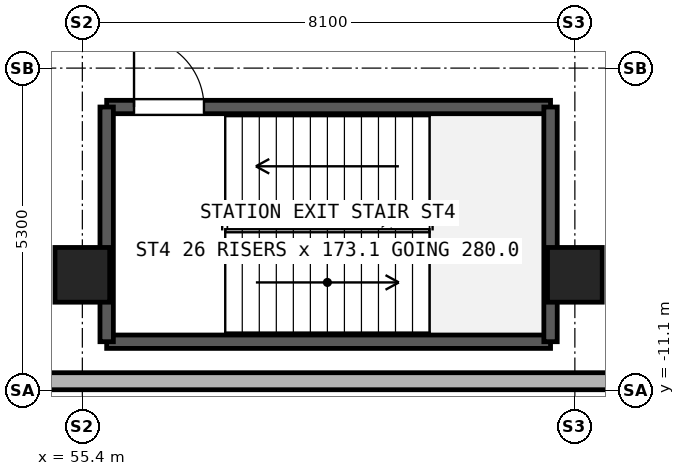
"""IFC4 building model, lengths in metres.
Left out: names, types, materials, properties, quantities, classifications, styles, units other than length and angle.
Written with IfcOpenShell. Run it as: python <this file> out.ifc"""

import sys

from ifc_helpers import new_model, si_unit, direction, frame, frame_2d, origin, origin_2d, place, context, subcontext, project, spatial, rectangle, hollow_rectangle, extrude, source, transform, mapped, element, fill, save


model = new_model("IFC4")
c1 = context("Model", 3, precision=1e-05, world=origin(), true_north=direction((0.0, 1.0)))
c2 = subcontext(c1, "Body", "Model", "MODEL_VIEW")
j1 = project(units=[si_unit("LENGTHUNIT", "METRE"), si_unit("PLANEANGLEUNIT", "RADIAN")], contexts=[c1])
p1 = place(None, origin())
s1 = spatial("IfcSite", under=j1, at=p1, CompositionType="ELEMENT")
p2 = place(p1, origin())
s2 = spatial("IfcBuilding", under=s1, at=p2, CompositionType="ELEMENT")
p3 = place(p2, frame((0.0, 0.0, 9.0)))
s3 = spatial("IfcBuildingStorey", under=s2, at=p3, CompositionType="ELEMENT", Elevation=9.0)
m1 = source(origin(), c2, "Body", "SweptSolid", [
    extrude(hollow_rectangle(XDim=0.7, YDim=0.9, WallThickness=0.04, at=origin_2d()), origin(), (0.0, 0.0, 1.0), 4.18),
])
for number, where, z_axis, x_axis in (
    (1, (55.4, -9.2, 0.0), (0.0, 0.0, 1.0), (1.0, 0.0, 0.0)),
    (2, (63.5, -9.2, 0.0), (0.0, 0.0, 1.0), (1.0, 0.0, 0.0)),
):
    element("IfcColumn", number, at=place(p3, frame(where, z_axis=z_axis, x_axis=x_axis)), inside=s3, PredefinedType="COLUMN", context=c2, shape_type="MappedRepresentation", body=[
        mapped(m1, transform((0.0, 0.0, 0.0), x_axis=(1.0, 0.0, 0.0), y_axis=(0.0, 1.0, 0.0), z_axis=(0.0, 0.0, 1.0), scale=1.0)),
    ])
p4 = place(p3, frame((41.9, -10.95, 0.0), z_axis=(0.0, 0.0, 1.0), x_axis=(1.0, 0.0, 0.0)))
e3 = element("IfcWall", 3, at=p4, inside=s3, PredefinedType="SOLIDWALL", context=c2, shape_type="SweptSolid", body=[
    extrude(rectangle(XDim=29.55, YDim=0.28, at=frame_2d((14.775, 0.0))), origin(), (0.0, 0.0, 1.0), 4.18),
])
p5 = place(p4, frame((6.3, 0.0, 1.1)))
e4 = element("IfcOpeningElement", 4, at=p5, cuts=e3, PredefinedType="OPENING", context=c2, shape_type="SweptSolid", body=[
    extrude(rectangle(XDim=1.6, YDim=1.4, at=frame_2d((0.8, 0.7))), frame((0.0, 0.15, 0.0), z_axis=(0.0, -1.0, 0.0), x_axis=(1.0, 0.0, 0.0)), (0.0, 0.0, 1.0), 0.3),
])
p6 = place(p3, frame((55.8, -10.3, 0.0), z_axis=(0.0, 0.0, 1.0), x_axis=(1.0, 0.0, 0.0)))
e5 = element("IfcWall", 5, at=p6, inside=s3, PredefinedType="SOLIDWALL", context=c2, shape_type="SweptSolid", body=[
    extrude(rectangle(XDim=7.3, YDim=0.22, at=frame_2d((3.65, 0.0))), origin(), (0.0, 0.0, 1.0), 4.18),
])
p7 = place(p3, frame((55.8, -6.44, 0.0), z_axis=(0.0, 0.0, 1.0), x_axis=(1.0, 0.0, 0.0)))
e6 = element("IfcWall", 6, at=p7, inside=s3, PredefinedType="SOLIDWALL", context=c2, shape_type="SweptSolid", body=[
    extrude(rectangle(XDim=7.3, YDim=0.22, at=frame_2d((3.65, 0.0))), origin(), (0.0, 0.0, 1.0), 4.18),
])
p8 = place(p7, frame((0.45, 0.0, 0.0)))
e7 = element("IfcOpeningElement", 7, at=p8, cuts=e6, PredefinedType="OPENING", context=c2, shape_type="SweptSolid", body=[
    extrude(rectangle(XDim=1.15, YDim=2.2, at=frame_2d((0.575, 1.1))), frame((0.0, 0.12, 0.0), z_axis=(0.0, -1.0, 0.0), x_axis=(1.0, 0.0, 0.0)), (0.0, 0.0, 1.0), 0.24),
])
for number, where, z_axis, x_axis in (
    (8, (55.8, -10.3, 0.0), (0.0, 0.0, 1.0), (0.0, 1.0, 0.0)),
    (9, (63.1, -10.3, 0.0), (0.0, 0.0, 1.0), (0.0, 1.0, 0.0)),
):
    element("IfcWall", number, at=place(p3, frame(where, z_axis=z_axis, x_axis=x_axis)), inside=s3, PredefinedType="SOLIDWALL", context=c2, shape_type="SweptSolid", body=[
        extrude(rectangle(XDim=3.86, YDim=0.22, at=frame_2d((1.93, 0.0))), origin(), (0.0, 0.0, 1.0), 4.18),
    ])
p9 = place(p8, origin())
e10 = element("IfcDoor", 10, at=p9, inside=s3, OperationType="SINGLE_SWING_LEFT", PredefinedType="DOOR", context=c2, shape_type="SweptSolid", body=[
    extrude(rectangle(XDim=1.15, YDim=2.2, at=frame_2d((0.575, 1.1))), frame((0.0, 0.025, 0.0), z_axis=(0.0, -1.0, 0.0), x_axis=(1.0, 0.0, 0.0)), (0.0, 0.0, 1.0), 0.05),
])
fill(e7, e10)
save(model, sys.argv[1])
